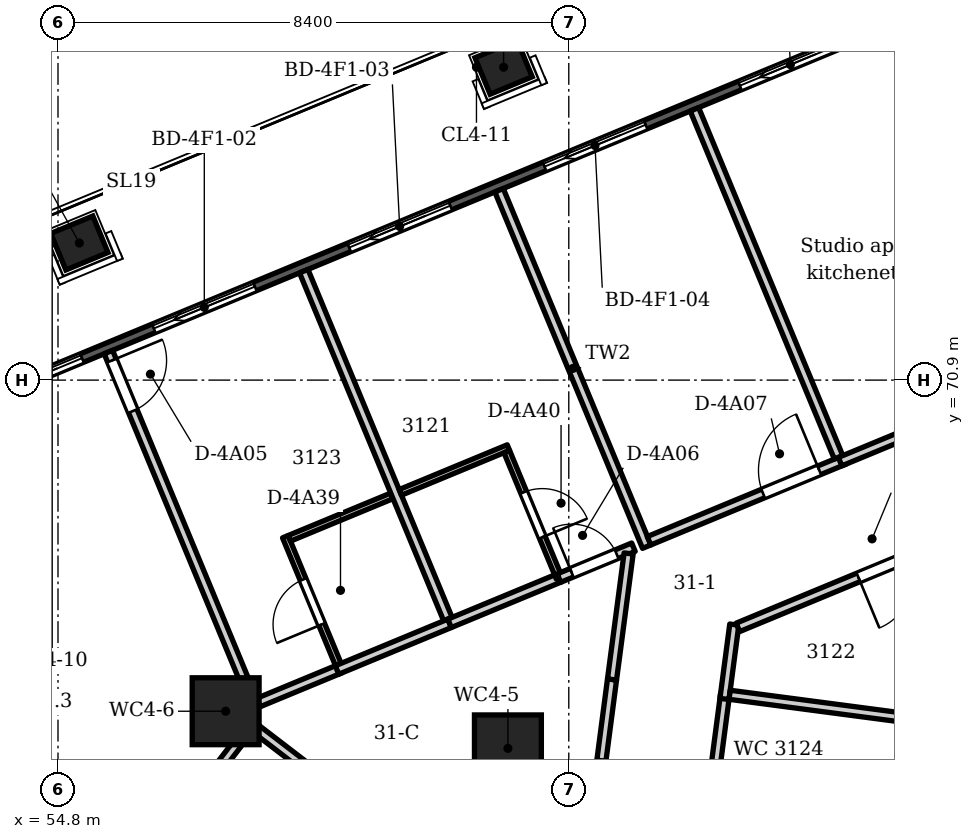
"""IFC4 building model, lengths in metres.
Left out: names, types, materials, properties, quantities, classifications, styles, units other than length and angle.
Written with IfcOpenShell. Run it as: python <this file> out.ifc"""

import sys

from ifc_helpers import new_model, si_unit, direction, frame, frame_2d, origin, origin_2d, place, context, subcontext, project, spatial, polyline, rectangle, circle, outline, extrude, element, fill, save


model = new_model("IFC4")
c1 = context("Model", 3, precision=1e-05, world=origin(), true_north=direction((0.0, 1.0)))
c2 = subcontext(c1, "Body", "Model", "MODEL_VIEW")
j1 = project(units=[si_unit("LENGTHUNIT", "METRE"), si_unit("PLANEANGLEUNIT", "RADIAN")], contexts=[c1])
p1 = place(None, origin())
s1 = spatial("IfcSite", under=j1, at=p1, CompositionType="ELEMENT")
p2 = place(p1, origin())
s2 = spatial("IfcBuilding", under=s1, at=p2, CompositionType="ELEMENT")
p3 = place(p2, frame((0.0, 0.0, 124.2)))
s3 = spatial("IfcBuildingStorey", under=s2, at=p3, CompositionType="ELEMENT", Elevation=124.2)
for number, where, z_axis, x_axis in (
    (1, (55.151, 73.155, -0.35), (0.0, 0.0, 1.0), (0.924, 0.383, 0.0)),
    (2, (62.128, 76.045, -0.35), (0.0, 0.0, 1.0), (0.924, 0.383, 0.0)),
):
    element("IfcColumn", number, at=place(p3, frame(where, z_axis=z_axis, x_axis=x_axis)), inside=s3, PredefinedType="COLUMN", context=c2, shape_type="SweptSolid", body=[
        extrude(rectangle(XDim=0.75, YDim=0.65, at=origin_2d()), origin(), (0.0, 0.0, 1.0), 3.95),
    ])
for number, where, z_axis, x_axis in (
    (3, (62.199, 64.844, -0.35), (0.0, 0.0, 1.0), (1.0, 0.0, 0.0)),
    (4, (57.557, 65.455, -0.35), (0.0, 0.0, 1.0), (1.0, 0.0, 0.0)),
):
    element("IfcColumn", number, at=place(p3, frame(where, z_axis=z_axis, x_axis=x_axis)), inside=s3, PredefinedType="COLUMN", context=c2, shape_type="SweptSolid", body=[
        extrude(circle(Radius=0.55, at=origin_2d()), origin(), (0.0, 0.0, 1.0), 3.95),
    ])
p4 = place(p3, frame((52.387, 70.1, 0.0), z_axis=(0.0, 0.0, 1.0), x_axis=(0.92388051416, 0.382681062447, 0.0)))
e5 = element("IfcWall", 5, at=p4, inside=s3, PredefinedType="SOLIDWALL", context=c2, shape_type="SweptSolid", body=[
    extrude(outline(polyline([(0.149, 0.075), (0.149, -0.075), (45.057, -0.075), (45.057, 0.075), (0.149, 0.075)])), origin(), (0.0, 0.0, 1.0), 3.3),
])
p5 = place(p4, frame((1.239, 0.0, 0.0)))
e6 = element("IfcOpeningElement", 6, at=p5, cuts=e5, PredefinedType="OPENING", context=c2, shape_type="SweptSolid", body=[
    extrude(rectangle(XDim=1.8, YDim=2.6, at=frame_2d((0.9, 1.3))), frame((0.0, 0.085, 0.0), z_axis=(0.0, -1.0, 0.0), x_axis=(1.0, 0.0, 0.0)), (0.0, 0.0, 1.0), 0.17),
])
p6 = place(p4, frame((4.316, 0.0, 0.0)))
e7 = element("IfcOpeningElement", 7, at=p6, cuts=e5, PredefinedType="OPENING", context=c2, shape_type="SweptSolid", body=[
    extrude(rectangle(XDim=1.8, YDim=2.6, at=frame_2d((0.9, 1.3))), frame((0.0, 0.085, 0.0), z_axis=(0.0, -1.0, 0.0), x_axis=(1.0, 0.0, 0.0)), (0.0, 0.0, 1.0), 0.17),
])
p7 = place(p4, frame((7.793, 0.0, 0.0)))
e8 = element("IfcOpeningElement", 8, at=p7, cuts=e5, PredefinedType="OPENING", context=c2, shape_type="SweptSolid", body=[
    extrude(rectangle(XDim=1.8, YDim=2.6, at=frame_2d((0.9, 1.3))), frame((0.0, 0.085, 0.0), z_axis=(0.0, -1.0, 0.0), x_axis=(1.0, 0.0, 0.0)), (0.0, 0.0, 1.0), 0.17),
])
p8 = place(p4, frame((11.271, 0.0, 0.0)))
e9 = element("IfcOpeningElement", 9, at=p8, cuts=e5, PredefinedType="OPENING", context=c2, shape_type="SweptSolid", body=[
    extrude(rectangle(XDim=1.8, YDim=2.6, at=frame_2d((0.9, 1.3))), frame((0.0, 0.085, 0.0), z_axis=(0.0, -1.0, 0.0), x_axis=(1.0, 0.0, 0.0)), (0.0, 0.0, 1.0), 0.17),
])
p9 = place(p4, frame((14.748, 0.0, 0.0)))
e10 = element("IfcOpeningElement", 10, at=p9, cuts=e5, PredefinedType="OPENING", context=c2, shape_type="SweptSolid", body=[
    extrude(rectangle(XDim=1.8, YDim=2.6, at=frame_2d((0.9, 1.3))), frame((0.0, 0.085, 0.0), z_axis=(0.0, -1.0, 0.0), x_axis=(1.0, 0.0, 0.0)), (0.0, 0.0, 1.0), 0.17),
])
p10 = place(p4, frame((18.226, 0.0, 0.0)))
e11 = element("IfcOpeningElement", 11, at=p10, cuts=e5, PredefinedType="OPENING", context=c2, shape_type="SweptSolid", body=[
    extrude(rectangle(XDim=1.8, YDim=2.6, at=frame_2d((0.9, 1.3))), frame((0.0, 0.085, 0.0), z_axis=(0.0, -1.0, 0.0), x_axis=(1.0, 0.0, 0.0)), (0.0, 0.0, 1.0), 0.17),
])
p11 = place(p4, frame((21.703, 0.0, 0.0)))
e12 = element("IfcOpeningElement", 12, at=p11, cuts=e5, PredefinedType="OPENING", context=c2, shape_type="SweptSolid", body=[
    extrude(rectangle(XDim=1.8, YDim=2.6, at=frame_2d((0.9, 1.3))), frame((0.0, 0.085, 0.0), z_axis=(0.0, -1.0, 0.0), x_axis=(1.0, 0.0, 0.0)), (0.0, 0.0, 1.0), 0.17),
])
p12 = place(p4, frame((25.18, 0.0, 0.0)))
e13 = element("IfcOpeningElement", 13, at=p12, cuts=e5, PredefinedType="OPENING", context=c2, shape_type="SweptSolid", body=[
    extrude(rectangle(XDim=1.8, YDim=2.6, at=frame_2d((0.9, 1.3))), frame((0.0, 0.085, 0.0), z_axis=(0.0, -1.0, 0.0), x_axis=(1.0, 0.0, 0.0)), (0.0, 0.0, 1.0), 0.17),
])
p13 = place(p4, frame((28.658, 0.0, 0.0)))
e14 = element("IfcOpeningElement", 14, at=p13, cuts=e5, PredefinedType="OPENING", context=c2, shape_type="SweptSolid", body=[
    extrude(rectangle(XDim=1.8, YDim=2.6, at=frame_2d((0.9, 1.3))), frame((0.0, 0.085, 0.0), z_axis=(0.0, -1.0, 0.0), x_axis=(1.0, 0.0, 0.0)), (0.0, 0.0, 1.0), 0.17),
])
p14 = place(p4, frame((32.135, 0.0, 0.0)))
e15 = element("IfcOpeningElement", 15, at=p14, cuts=e5, PredefinedType="OPENING", context=c2, shape_type="SweptSolid", body=[
    extrude(rectangle(XDim=1.8, YDim=2.6, at=frame_2d((0.9, 1.3))), frame((0.0, 0.085, 0.0), z_axis=(0.0, -1.0, 0.0), x_axis=(1.0, 0.0, 0.0)), (0.0, 0.0, 1.0), 0.17),
])
p15 = place(p4, frame((35.613, 0.0, 0.0)))
e16 = element("IfcOpeningElement", 16, at=p15, cuts=e5, PredefinedType="OPENING", context=c2, shape_type="SweptSolid", body=[
    extrude(rectangle(XDim=1.8, YDim=2.6, at=frame_2d((0.9, 1.3))), frame((0.0, 0.085, 0.0), z_axis=(0.0, -1.0, 0.0), x_axis=(1.0, 0.0, 0.0)), (0.0, 0.0, 1.0), 0.17),
])
p16 = place(p4, frame((39.09, 0.0, 0.0)))
e17 = element("IfcOpeningElement", 17, at=p16, cuts=e5, PredefinedType="OPENING", context=c2, shape_type="SweptSolid", body=[
    extrude(rectangle(XDim=1.8, YDim=2.6, at=frame_2d((0.9, 1.3))), frame((0.0, 0.085, 0.0), z_axis=(0.0, -1.0, 0.0), x_axis=(1.0, 0.0, 0.0)), (0.0, 0.0, 1.0), 0.17),
])
p17 = place(p4, frame((42.167, 0.0, 0.0)))
e18 = element("IfcOpeningElement", 18, at=p17, cuts=e5, PredefinedType="OPENING", context=c2, shape_type="SweptSolid", body=[
    extrude(rectangle(XDim=1.8, YDim=2.6, at=frame_2d((0.9, 1.3))), frame((0.0, 0.085, 0.0), z_axis=(0.0, -1.0, 0.0), x_axis=(1.0, 0.0, 0.0)), (0.0, 0.0, 1.0), 0.17),
])
p18 = place(p3, origin())
e19 = element("IfcWall", 19, at=p18, inside=s3, PredefinedType="PARAPET", context=c2, shape_type="SweptSolid", body=[
    extrude(outline(polyline([(76.333, 82.578), (47.563, 75.405), (47.803, 75.156), (74.457, 81.802), (76.333, 82.578)])), origin(), (0.0, 0.0, 1.0), 1.1),
])
p19 = place(p3, frame((54.165, 60.249, 0.0), z_axis=(0.0, 0.0, 1.0), x_axis=(0.608817658648, 0.793310190605, 0.0)))
e20 = element("IfcWall", 20, at=p19, inside=s3, PredefinedType="PARTITIONING", context=c2, shape_type="SweptSolid", body=[
    extrude(rectangle(XDim=6.344, YDim=0.15, at=frame_2d((3.172, 0.0))), origin(), (0.0, 0.0, 1.0), 2.8),
])
p20 = place(p19, frame((0.15, 0.0, 0.0)))
e21 = element("IfcOpeningElement", 21, at=p20, cuts=e20, PredefinedType="OPENING", context=c2, shape_type="SweptSolid", body=[
    extrude(rectangle(XDim=0.9, YDim=2.1, at=frame_2d((0.45, 1.05))), frame((0.0, 0.085, 0.0), z_axis=(0.0, -1.0, 0.0), x_axis=(1.0, 0.0, 0.0)), (0.0, 0.0, 1.0), 0.17),
])
p21 = place(p3, frame((55.628, 71.361, 0.0), z_axis=(0.0, 0.0, 1.0), x_axis=(0.38260330851, -0.923912716828, 0.0)))
e22 = element("IfcWall", 22, at=p21, inside=s3, PredefinedType="PARTITIONING", context=c2, shape_type="SweptSolid", body=[
    extrude(rectangle(XDim=6.344, YDim=0.15, at=frame_2d((3.172, 0.0))), origin(), (0.0, 0.0, 1.0), 2.8),
])
p22 = place(p21, frame((0.15, 0.0, 0.0)))
e23 = element("IfcOpeningElement", 23, at=p22, cuts=e22, PredefinedType="OPENING", context=c2, shape_type="SweptSolid", body=[
    extrude(rectangle(XDim=0.9, YDim=2.1, at=frame_2d((0.45, 1.05))), frame((0.0, 0.085, 0.0), z_axis=(0.0, -1.0, 0.0), x_axis=(1.0, 0.0, 0.0)), (0.0, 0.0, 1.0), 0.17),
])
p23 = place(p3, frame((58.042, 65.176, 0.0), z_axis=(0.0, 0.0, 1.0), x_axis=(0.793390311924, -0.608713243609, 0.0)))
e24 = element("IfcWall", 24, at=p23, inside=s3, PredefinedType="PARTITIONING", context=c2, shape_type="SweptSolid", body=[
    extrude(rectangle(XDim=17.064, YDim=0.15, at=frame_2d((8.532, 0.0))), origin(), (0.0, 0.0, 1.0), 2.8),
])
p24 = place(p23, frame((7.029, 0.0, 0.0)))
e25 = element("IfcOpeningElement", 25, at=p24, cuts=e24, PredefinedType="OPENING", context=c2, shape_type="SweptSolid", body=[
    extrude(rectangle(XDim=0.9, YDim=2.1, at=frame_2d((0.45, 1.05))), frame((0.0, 0.085, 0.0), z_axis=(0.0, -1.0, 0.0), x_axis=(1.0, 0.0, 0.0)), (0.0, 0.0, 1.0), 0.17),
])
p25 = place(p23, frame((3.551, 0.0, 0.0)))
e26 = element("IfcOpeningElement", 26, at=p25, cuts=e24, PredefinedType="OPENING", context=c2, shape_type="SweptSolid", body=[
    extrude(rectangle(XDim=0.9, YDim=2.1, at=frame_2d((0.45, 1.05))), frame((0.0, 0.085, 0.0), z_axis=(0.0, -1.0, 0.0), x_axis=(1.0, 0.0, 0.0)), (0.0, 0.0, 1.0), 0.17),
])
p26 = place(p3, frame((58.096, 65.598, 0.0), z_axis=(0.0, 0.0, 1.0), x_axis=(0.923888134281, 0.382662665196, 0.0)))
e27 = element("IfcWall", 27, at=p26, inside=s3, PredefinedType="PARTITIONING", context=c2, shape_type="SweptSolid", body=[
    extrude(rectangle(XDim=1.457, YDim=0.15, at=frame_2d((0.728, 0.0))), origin(), (0.0, 0.0, 1.0), 2.8),
])
p27 = place(p3, frame((58.539, 68.325, 0.0), z_axis=(0.0, 0.0, 1.0), x_axis=(0.382595073996, -0.923916126796, 0.0)))
e28 = element("IfcWall", 28, at=p27, inside=s3, PredefinedType="PARTITIONING", context=c2, shape_type="SweptSolid", body=[
    extrude(rectangle(XDim=2.275, YDim=0.1, at=frame_2d((1.137, 0.0))), origin(), (0.0, 0.0, 1.0), 3.3),
])
p28 = place(p27, frame((0.763, 0.0, 0.0)))
e29 = element("IfcOpeningElement", 29, at=p28, cuts=e28, PredefinedType="OPENING", context=c2, shape_type="SweptSolid", body=[
    extrude(rectangle(XDim=0.8, YDim=2.1, at=frame_2d((0.4, 1.05))), frame((0.0, 0.06, 0.0), z_axis=(0.0, -1.0, 0.0), x_axis=(1.0, 0.0, 0.0)), (0.0, 0.0, 1.0), 0.12),
])
p29 = place(p3, frame((58.604, 68.298, 0.0), z_axis=(0.0, 0.0, 1.0), x_axis=(0.923945120737, 0.382525049986, 0.0)))
e30 = element("IfcWall", 30, at=p29, inside=s3, PredefinedType="PARTITIONING", context=c2, shape_type="SweptSolid", body=[
    extrude(rectangle(XDim=1.825, YDim=0.1, at=frame_2d((0.913, 0.0))), origin(), (0.0, 0.0, 1.0), 3.3),
])
p30 = place(p3, frame((58.841, 72.692, 0.0), z_axis=(0.0, 0.0, 1.0), x_axis=(0.382610562407, -0.923909712869, 0.0)))
e31 = element("IfcWall", 31, at=p30, inside=s3, PredefinedType="PARTITIONING", context=c2, shape_type="SweptSolid", body=[
    extrude(rectangle(XDim=6.194, YDim=0.15, at=frame_2d((3.097, 0.0))), origin(), (0.0, 0.0, 1.0), 3.3),
])
p31 = place(p3, frame((59.389, 66.133, 0.0), z_axis=(0.0, 0.0, 1.0), x_axis=(0.923817799338, 0.382832435442, 0.0)))
e32 = element("IfcWall", 32, at=p31, inside=s3, PredefinedType="PARTITIONING", context=c2, shape_type="SweptSolid", body=[
    extrude(rectangle(XDim=2.004, YDim=0.15, at=frame_2d((1.002, 0.0))), origin(), (0.0, 0.0, 1.0), 3.3),
])
p32 = place(p3, frame((60.429, 69.054, 0.0), z_axis=(0.0, 0.0, 1.0), x_axis=(0.923911704446, 0.382605753207, 0.0)))
e33 = element("IfcWall", 33, at=p32, inside=s3, PredefinedType="PARTITIONING", context=c2, shape_type="SweptSolid", body=[
    extrude(rectangle(XDim=1.925, YDim=0.1, at=frame_2d((0.962, 0.0))), origin(), (0.0, 0.0, 1.0), 3.3),
])
p33 = place(p3, frame((61.24, 66.9, 0.0), z_axis=(0.0, 0.0, 1.0), x_axis=(0.92387678234, 0.382690071798, 0.0)))
e34 = element("IfcWall", 34, at=p33, inside=s3, PredefinedType="PARTITIONING", context=c2, shape_type="SweptSolid", body=[
    extrude(rectangle(XDim=1.955, YDim=0.15, at=frame_2d((0.977, 0.0))), origin(), (0.0, 0.0, 1.0), 3.3),
])
p34 = place(p3, frame((62.053, 74.022, 0.0), z_axis=(0.0, 0.0, 1.0), x_axis=(0.382821977845, -0.923822132923, 0.0)))
e35 = element("IfcWall", 35, at=p34, inside=s3, PredefinedType="PARTITIONING", context=c2, shape_type="SweptSolid", body=[
    extrude(rectangle(XDim=6.344, YDim=0.15, at=frame_2d((3.172, 0.0))), origin(), (0.0, 0.0, 1.0), 3.3),
])
p35 = place(p3, frame((62.18, 69.725, 0.0), z_axis=(0.0, 0.0, 1.0), x_axis=(0.382958575782, -0.92376551637, 0.0)))
e36 = element("IfcWall", 36, at=p35, inside=s3, PredefinedType="PARTITIONING", context=c2, shape_type="SweptSolid", body=[
    extrude(rectangle(XDim=2.25, YDim=0.1, at=frame_2d((1.125, 0.0))), origin(), (0.0, 0.0, 1.0), 3.3),
])
p36 = place(p35, frame((0.725, 0.0, 0.0)))
e37 = element("IfcOpeningElement", 37, at=p36, cuts=e36, PredefinedType="OPENING", context=c2, shape_type="SweptSolid", body=[
    extrude(rectangle(XDim=0.8, YDim=2.1, at=frame_2d((0.4, 1.05))), frame((0.0, 0.06, 0.0), z_axis=(0.0, -1.0, 0.0), x_axis=(1.0, 0.0, 0.0)), (0.0, 0.0, 1.0), 0.12),
])
p37 = place(p3, frame((63.038, 67.644, 0.0), z_axis=(0.0, 0.0, 1.0), x_axis=(0.923848523473, 0.38275828623, 0.0)))
e38 = element("IfcWall", 38, at=p37, inside=s3, PredefinedType="PARTITIONING", context=c2, shape_type="SweptSolid", body=[
    extrude(rectangle(XDim=1.326, YDim=0.15, at=frame_2d((0.663, 0.0))), origin(), (0.0, 0.0, 1.0), 3.3),
])
p38 = place(p37, frame((0.228, 0.0, 0.0)))
e39 = element("IfcOpeningElement", 39, at=p38, cuts=e38, PredefinedType="OPENING", context=c2, shape_type="SweptSolid", body=[
    extrude(rectangle(XDim=0.8, YDim=2.1, at=frame_2d((0.4, 1.05))), frame((0.0, 0.085, 0.0), z_axis=(0.0, -1.0, 0.0), x_axis=(1.0, 0.0, 0.0)), (0.0, 0.0, 1.0), 0.17),
])
p39 = place(p3, frame((63.736, 64.641, 0.0), z_axis=(0.0, 0.0, 1.0), x_axis=(0.129741998441, 0.991547786968, 0.0)))
e40 = element("IfcWall", 40, at=p39, inside=s3, PredefinedType="PARTITIONING", context=c2, shape_type="SweptSolid", body=[
    extrude(rectangle(XDim=1.347, YDim=0.15, at=frame_2d((0.674, 0.0))), origin(), (0.0, 0.0, 1.0), 2.7),
])
p40 = place(p3, frame((63.911, 65.977, 0.0), z_axis=(0.0, 0.0, 1.0), x_axis=(0.13074768898, 0.9914156756, 0.0)))
e41 = element("IfcWall", 41, at=p40, inside=s3, PredefinedType="PARTITIONING", context=c2, shape_type="SweptSolid", body=[
    extrude(rectangle(XDim=2.089, YDim=0.15, at=frame_2d((1.045, 0.0))), origin(), (0.0, 0.0, 1.0), 3.3),
])
p41 = place(p3, frame((64.519, 68.258, 0.0), z_axis=(0.0, 0.0, 1.0), x_axis=(0.923914357305, 0.382599347053, 0.0)))
e42 = element("IfcWall", 42, at=p41, inside=s3, PredefinedType="PARTITIONING", context=c2, shape_type="SweptSolid", body=[
    extrude(rectangle(XDim=3.484, YDim=0.15, at=frame_2d((1.742, 0.0))), origin(), (0.0, 0.0, 1.0), 3.3),
])
p42 = place(p41, frame((2.031, 0.0, 0.0)))
e43 = element("IfcOpeningElement", 43, at=p42, cuts=e42, PredefinedType="OPENING", context=c2, shape_type="SweptSolid", body=[
    extrude(rectangle(XDim=1.0, YDim=2.1, at=frame_2d((0.5, 1.05))), frame((0.0, 0.085, 0.0), z_axis=(0.0, -1.0, 0.0), x_axis=(1.0, 0.0, 0.0)), (0.0, 0.0, 1.0), 0.17),
])
p43 = place(p3, frame((65.266, 75.353, 0.0), z_axis=(0.0, 0.0, 1.0), x_axis=(0.382610562407, -0.923909712869, 0.0)))
e44 = element("IfcWall", 44, at=p43, inside=s3, PredefinedType="PARTITIONING", context=c2, shape_type="SweptSolid", body=[
    extrude(rectangle(XDim=6.194, YDim=0.15, at=frame_2d((3.097, 0.0))), origin(), (0.0, 0.0, 1.0), 3.3),
])
p44 = place(p3, frame((65.473, 63.476, 0.0), z_axis=(0.0, 0.0, 1.0), x_axis=(0.130468344309, 0.991452475479, 0.0)))
e45 = element("IfcWall", 45, at=p44, inside=s3, PredefinedType="PARTITIONING", context=c2, shape_type="SweptSolid", body=[
    extrude(rectangle(XDim=2.283, YDim=0.15, at=frame_2d((1.142, 0.0))), origin(), (0.0, 0.0, 1.0), 2.7),
])
p45 = place(p3, frame((65.76, 65.656, 0.0), z_axis=(0.0, 0.0, 1.0), x_axis=(0.131022785859, 0.99137935705, 0.0)))
e46 = element("IfcWall", 46, at=p45, inside=s3, PredefinedType="PARTITIONING", context=c2, shape_type="SweptSolid", body=[
    extrude(rectangle(XDim=1.234, YDim=0.15, at=frame_2d((0.617, 0.0))), origin(), (0.0, 0.0, 1.0), 3.3),
])
p46 = place(p3, frame((65.845, 65.725, 0.0), z_axis=(0.0, 0.0, 1.0), x_axis=(0.991429142169, -0.130645535929, 0.0)))
e47 = element("IfcWall", 47, at=p46, inside=s3, PredefinedType="PARTITIONING", context=c2, shape_type="SweptSolid", body=[
    extrude(rectangle(XDim=3.108, YDim=0.15, at=frame_2d((1.554, 0.0))), origin(), (0.0, 0.0, 1.0), 3.3),
])
p47 = place(p3, frame((65.981, 66.834, 0.0), z_axis=(0.0, 0.0, 1.0), x_axis=(0.923830903719, 0.382800811563, 0.0)))
e48 = element("IfcWall", 48, at=p47, inside=s3, PredefinedType="PARTITIONING", context=c2, shape_type="SweptSolid", body=[
    extrude(rectangle(XDim=5.266, YDim=0.15, at=frame_2d((2.633, 0.0))), origin(), (0.0, 0.0, 1.0), 3.3),
])
p48 = place(p47, frame((2.146, 0.0, 0.0)))
e49 = element("IfcOpeningElement", 49, at=p48, cuts=e48, PredefinedType="OPENING", context=c2, shape_type="SweptSolid", body=[
    extrude(rectangle(XDim=0.9, YDim=2.1, at=frame_2d((0.45, 1.05))), frame((0.0, 0.085, 0.0), z_axis=(0.0, -1.0, 0.0), x_axis=(1.0, 0.0, 0.0)), (0.0, 0.0, 1.0), 0.17),
])
p49 = place(p3, frame((67.662, 69.559, 0.0), z_axis=(0.0, 0.0, 1.0), x_axis=(0.923858526334, 0.382734141827, 0.0)))
e50 = element("IfcWall", 50, at=p49, inside=s3, PredefinedType="PARTITIONING", context=c2, shape_type="SweptSolid", body=[
    extrude(rectangle(XDim=4.812, YDim=0.15, at=frame_2d((2.406, 0.0))), origin(), (0.0, 0.0, 1.0), 3.3),
])
p50 = place(p49, frame((2.431, 0.0, 0.0)))
e51 = element("IfcOpeningElement", 51, at=p50, cuts=e50, PredefinedType="OPENING", context=c2, shape_type="SweptSolid", body=[
    extrude(rectangle(XDim=0.9, YDim=2.1, at=frame_2d((0.45, 1.05))), frame((0.0, 0.085, 0.0), z_axis=(0.0, -1.0, 0.0), x_axis=(1.0, 0.0, 0.0)), (0.0, 0.0, 1.0), 0.17),
])
p51 = place(p5, origin())
e52 = element("IfcDoor", 52, at=p51, inside=s3, OperationType="SLIDING_TO_LEFT", PredefinedType="DOOR", context=c2, shape_type="SweptSolid", body=[
    extrude(rectangle(XDim=1.8, YDim=2.6, at=frame_2d((0.9, 1.3))), frame((0.0, 0.025, 0.0), z_axis=(0.0, -1.0, 0.0), x_axis=(1.0, 0.0, 0.0)), (0.0, 0.0, 1.0), 0.05),
])
fill(e6, e52)
p52 = place(p6, origin())
e53 = element("IfcDoor", 53, at=p52, inside=s3, OperationType="SLIDING_TO_LEFT", PredefinedType="DOOR", context=c2, shape_type="SweptSolid", body=[
    extrude(rectangle(XDim=1.8, YDim=2.6, at=frame_2d((0.9, 1.3))), frame((0.0, 0.025, 0.0), z_axis=(0.0, -1.0, 0.0), x_axis=(1.0, 0.0, 0.0)), (0.0, 0.0, 1.0), 0.05),
])
fill(e7, e53)
p53 = place(p7, origin())
e54 = element("IfcDoor", 54, at=p53, inside=s3, OperationType="SLIDING_TO_LEFT", PredefinedType="DOOR", context=c2, shape_type="SweptSolid", body=[
    extrude(rectangle(XDim=1.8, YDim=2.6, at=frame_2d((0.9, 1.3))), frame((0.0, 0.025, 0.0), z_axis=(0.0, -1.0, 0.0), x_axis=(1.0, 0.0, 0.0)), (0.0, 0.0, 1.0), 0.05),
])
fill(e8, e54)
p54 = place(p8, origin())
e55 = element("IfcDoor", 55, at=p54, inside=s3, OperationType="SLIDING_TO_LEFT", PredefinedType="DOOR", context=c2, shape_type="SweptSolid", body=[
    extrude(rectangle(XDim=1.8, YDim=2.6, at=frame_2d((0.9, 1.3))), frame((0.0, 0.025, 0.0), z_axis=(0.0, -1.0, 0.0), x_axis=(1.0, 0.0, 0.0)), (0.0, 0.0, 1.0), 0.05),
])
fill(e9, e55)
p55 = place(p9, origin())
e56 = element("IfcDoor", 56, at=p55, inside=s3, OperationType="SLIDING_TO_LEFT", PredefinedType="DOOR", context=c2, shape_type="SweptSolid", body=[
    extrude(rectangle(XDim=1.8, YDim=2.6, at=frame_2d((0.9, 1.3))), frame((0.0, 0.025, 0.0), z_axis=(0.0, -1.0, 0.0), x_axis=(1.0, 0.0, 0.0)), (0.0, 0.0, 1.0), 0.05),
])
fill(e10, e56)
p56 = place(p22, origin())
e57 = element("IfcDoor", 57, at=p56, inside=s3, OperationType="SINGLE_SWING_LEFT", PredefinedType="DOOR", context=c2, shape_type="SweptSolid", body=[
    extrude(rectangle(XDim=0.9, YDim=2.1, at=frame_2d((0.45, 1.05))), frame((0.0, 0.025, 0.0), z_axis=(0.0, -1.0, 0.0), x_axis=(1.0, 0.0, 0.0)), (0.0, 0.0, 1.0), 0.05),
])
fill(e23, e57)
p57 = place(p38, origin())
e58 = element("IfcDoor", 58, at=p57, inside=s3, OperationType="SINGLE_SWING_LEFT", PredefinedType="DOOR", context=c2, shape_type="SweptSolid", body=[
    extrude(rectangle(XDim=0.8, YDim=2.1, at=frame_2d((0.4, 1.05))), frame((0.0, 0.025, 0.0), z_axis=(0.0, -1.0, 0.0), x_axis=(1.0, 0.0, 0.0)), (0.0, 0.0, 1.0), 0.05),
])
fill(e39, e58)
p58 = place(p42, origin())
e59 = element("IfcDoor", 59, at=p58, inside=s3, OperationType="SINGLE_SWING_RIGHT", PredefinedType="DOOR", context=c2, shape_type="SweptSolid", body=[
    extrude(rectangle(XDim=1.0, YDim=2.1, at=frame_2d((0.5, 1.05))), frame((0.0, 0.025, 0.0), z_axis=(0.0, -1.0, 0.0), x_axis=(1.0, 0.0, 0.0)), (0.0, 0.0, 1.0), 0.05),
])
fill(e43, e59)
p59 = place(p48, frame((0.9, 0.0, 0.0), z_axis=(0.0, 0.0, 1.0), x_axis=(-1.0, 0.0, 0.0)))
e60 = element("IfcDoor", 60, at=p59, inside=s3, OperationType="SINGLE_SWING_RIGHT", PredefinedType="DOOR", context=c2, shape_type="SweptSolid", body=[
    extrude(rectangle(XDim=0.9, YDim=2.1, at=frame_2d((0.45, 1.05))), frame((0.0, 0.025, 0.0), z_axis=(0.0, -1.0, 0.0), x_axis=(1.0, 0.0, 0.0)), (0.0, 0.0, 1.0), 0.05),
])
fill(e49, e60)
p60 = place(p28, frame((0.8, 0.0, 0.0), z_axis=(0.0, 0.0, 1.0), x_axis=(-1.0, 0.0, 0.0)))
e61 = element("IfcDoor", 61, at=p60, inside=s3, OperationType="SINGLE_SWING_LEFT", PredefinedType="DOOR", context=c2, shape_type="SweptSolid", body=[
    extrude(rectangle(XDim=0.8, YDim=2.1, at=frame_2d((0.4, 1.05))), frame((0.0, 0.025, 0.0), z_axis=(0.0, -1.0, 0.0), x_axis=(1.0, 0.0, 0.0)), (0.0, 0.0, 1.0), 0.05),
])
fill(e29, e61)
p61 = place(p36, origin())
e62 = element("IfcDoor", 62, at=p61, inside=s3, OperationType="SINGLE_SWING_RIGHT", PredefinedType="DOOR", context=c2, shape_type="SweptSolid", body=[
    extrude(rectangle(XDim=0.8, YDim=2.1, at=frame_2d((0.4, 1.05))), frame((0.0, 0.025, 0.0), z_axis=(0.0, -1.0, 0.0), x_axis=(1.0, 0.0, 0.0)), (0.0, 0.0, 1.0), 0.05),
])
fill(e37, e62)
save(model, sys.argv[1])
